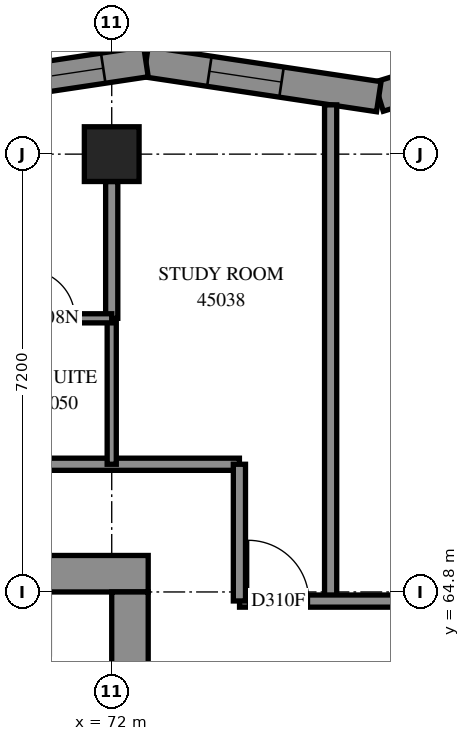
"""IFC4 building model, lengths in metres.
Left out: names, types, materials, properties, quantities, classifications, styles, units other than length and angle.
Written with IfcOpenShell. Run it as: python <this file> out.ifc"""

import sys

from ifc_helpers import new_model, si_unit, direction, frame, frame_2d, origin, origin_2d, place, context, subcontext, project, spatial, polyline, rectangle, outline, extrude, element, fill, save


model = new_model("IFC4")
c1 = context("Model", 3, precision=1e-05, world=origin(), true_north=direction((0.0, 1.0)))
c2 = subcontext(c1, "Body", "Model", "MODEL_VIEW")
j1 = project(units=[si_unit("LENGTHUNIT", "METRE"), si_unit("PLANEANGLEUNIT", "RADIAN")], contexts=[c1])
p1 = place(None, origin())
s1 = spatial("IfcSite", under=j1, at=p1, CompositionType="ELEMENT")
p2 = place(p1, origin())
s2 = spatial("IfcBuilding", under=s1, at=p2, CompositionType="ELEMENT")
p3 = place(p2, frame((0.0, 0.0, 166.0)))
s3 = spatial("IfcBuildingStorey", under=s2, at=p3, CompositionType="ELEMENT", Elevation=166.0)
p4 = place(p3, frame((72.0, 72.0, 0.0), z_axis=(0.0, 0.0, 1.0), x_axis=(1.0, 0.0, 0.0)))
e1 = element("IfcColumn", 1, at=p4, inside=s3, PredefinedType="COLUMN", context=c2, shape_type="SweptSolid", body=[
    extrude(rectangle(XDim=0.9, YDim=0.9, at=origin_2d()), origin(), (0.0, 0.0, 1.0), 3.1),
])
p5 = place(p3, frame((57.0, 65.1, -0.3), z_axis=(0.0, 0.0, 1.0), x_axis=(1.0, 0.0, 0.0)))
e2 = element("IfcWall", 2, at=p5, inside=s3, PredefinedType="SHEAR", context=c2, shape_type="SweptSolid", body=[
    extrude(rectangle(XDim=15.6, YDim=0.6, at=frame_2d((7.8, 0.0))), origin(), (0.0, 0.0, 1.0), 2.7),
])
p6 = place(p5, frame((10.6, 0.0, 0.3)))
e3 = element("IfcOpeningElement", 3, at=p6, cuts=e2, PredefinedType="OPENING", context=c2, shape_type="SweptSolid", body=[
    extrude(rectangle(XDim=0.8, YDim=2.1, at=frame_2d((0.4, 1.05))), frame((0.0, 0.31, 0.0), z_axis=(0.0, -1.0, 0.0), x_axis=(1.0, 0.0, 0.0)), (0.0, 0.0, 1.0), 0.62),
])
p7 = place(p3, frame((72.3, 50.4, -0.3), z_axis=(0.0, 0.0, 1.0), x_axis=(0.0, 1.0, 0.0)))
e4 = element("IfcWall", 4, at=p7, inside=s3, PredefinedType="SHEAR", context=c2, shape_type="SweptSolid", body=[
    extrude(rectangle(XDim=14.4, YDim=0.6, at=frame_2d((7.2, 0.0))), origin(), (0.0, 0.0, 1.0), 2.7),
])
p8 = place(p7, frame((4.55, 0.0, 0.3)))
e5 = element("IfcOpeningElement", 5, at=p8, cuts=e4, PredefinedType="OPENING", context=c2, shape_type="SweptSolid", body=[
    extrude(rectangle(XDim=1.1, YDim=2.1, at=frame_2d((0.55, 1.05))), frame((0.0, 0.31, 0.0), z_axis=(0.0, -1.0, 0.0), x_axis=(1.0, 0.0, 0.0)), (0.0, 0.0, 1.0), 0.62),
])
p9 = place(p7, frame((11.35, 0.0, 0.3)))
e6 = element("IfcOpeningElement", 6, at=p9, cuts=e4, PredefinedType="OPENING", context=c2, shape_type="SweptSolid", body=[
    extrude(rectangle(XDim=1.1, YDim=2.1, at=frame_2d((0.55, 1.05))), frame((0.0, 0.31, 0.0), z_axis=(0.0, -1.0, 0.0), x_axis=(1.0, 0.0, 0.0)), (0.0, 0.0, 1.0), 0.62),
])
p10 = place(p3, frame((80.051, 74.07, 0.0), z_axis=(0.0, 0.0, 1.0), x_axis=(-0.955794256, -0.2940362905, 0.0)))
e7 = element("IfcWall", 7, at=p10, inside=s3, PredefinedType="SOLIDWALL", context=c2, shape_type="SweptSolid", body=[
    extrude(outline(polyline([(-0.214, -0.25), (3.772, -0.25), (3.885, 0.25), (0.214, 0.25), (-0.214, -0.25)])), origin(), (0.0, 0.0, 1.0), 3.1),
])
p11 = place(p10, frame((1.659, 0.0, 0.45)))
e8 = element("IfcOpeningElement", 8, at=p11, cuts=e7, PredefinedType="OPENING", context=c2, shape_type="SweptSolid", body=[
    extrude(rectangle(XDim=1.2, YDim=2.5, at=frame_2d((0.6, 1.25))), frame((0.0, 0.26, 0.0), z_axis=(0.0, -1.0, 0.0), x_axis=(1.0, 0.0, 0.0)), (0.0, 0.0, 1.0), 0.52),
])
p12 = place(p3, frame((76.392, 72.944, 0.0), z_axis=(0.0, 0.0, 1.0), x_axis=(-0.9889143658, 0.1484869591, 0.0)))
e9 = element("IfcWall", 9, at=p12, inside=s3, PredefinedType="SOLIDWALL", context=c2, shape_type="SweptSolid", body=[
    extrude(outline(polyline([(0.057, -0.25), (3.909, -0.25), (3.834, 0.25), (-0.057, 0.25), (0.057, -0.25)])), origin(), (0.0, 0.0, 1.0), 3.1),
])
p13 = place(p12, frame((1.617, 0.0, 0.45)))
e10 = element("IfcOpeningElement", 10, at=p13, cuts=e9, PredefinedType="OPENING", context=c2, shape_type="SweptSolid", body=[
    extrude(rectangle(XDim=1.2, YDim=2.5, at=frame_2d((0.6, 1.25))), frame((0.0, 0.26, 0.0), z_axis=(0.0, -1.0, 0.0), x_axis=(1.0, 0.0, 0.0)), (0.0, 0.0, 1.0), 0.52),
])
p14 = place(p3, frame((72.563, 73.519, 0.0), z_axis=(0.0, 0.0, 1.0), x_axis=(-0.9889150173, -0.1484826202, 0.0)))
e11 = element("IfcWall", 11, at=p14, inside=s3, PredefinedType="SOLIDWALL", context=c2, shape_type="SweptSolid", body=[
    extrude(outline(polyline([(-0.037, -0.25), (3.815, -0.25), (3.89, 0.25), (0.037, 0.25), (-0.037, -0.25)])), origin(), (0.0, 0.0, 1.0), 3.1),
])
p15 = place(p14, frame((0.711, 0.0, 0.45)))
e12 = element("IfcOpeningElement", 12, at=p15, cuts=e11, PredefinedType="OPENING", context=c2, shape_type="SweptSolid", body=[
    extrude(rectangle(XDim=2.8, YDim=2.5, at=frame_2d((1.4, 1.25))), frame((0.0, 0.26, 0.0), z_axis=(0.0, -1.0, 0.0), x_axis=(1.0, 0.0, 0.0)), (0.0, 0.0, 1.0), 0.52),
])
p16 = place(p3, frame((55.5, 66.9, 0.0), z_axis=(0.0, 0.0, 1.0), x_axis=(1.0, 0.0, 0.0)))
e13 = element("IfcWall", 13, at=p16, inside=s3, PredefinedType="PARTITIONING", context=c2, shape_type="SweptSolid", body=[
    extrude(rectangle(XDim=18.6, YDim=0.2, at=frame_2d((9.3, 0.0))), origin(), (0.0, 0.0, 1.0), 3.1),
])
p17 = place(p16, frame((4.45, 0.0, 0.0)))
e14 = element("IfcOpeningElement", 14, at=p17, cuts=e13, PredefinedType="OPENING", context=c2, shape_type="SweptSolid", body=[
    extrude(rectangle(XDim=0.9, YDim=2.1, at=frame_2d((0.45, 1.05))), frame((0.0, 0.11, 0.0), z_axis=(0.0, -1.0, 0.0), x_axis=(1.0, 0.0, 0.0)), (0.0, 0.0, 1.0), 0.22),
])
p18 = place(p16, frame((6.1, 0.0, 0.0)))
e15 = element("IfcOpeningElement", 15, at=p18, cuts=e13, PredefinedType="OPENING", context=c2, shape_type="SweptSolid", body=[
    extrude(rectangle(XDim=0.9, YDim=2.1, at=frame_2d((0.45, 1.05))), frame((0.0, 0.11, 0.0), z_axis=(0.0, -1.0, 0.0), x_axis=(1.0, 0.0, 0.0)), (0.0, 0.0, 1.0), 0.22),
])
p19 = place(p16, frame((11.65, 0.0, 0.0)))
e16 = element("IfcOpeningElement", 16, at=p19, cuts=e13, PredefinedType="OPENING", context=c2, shape_type="SweptSolid", body=[
    extrude(rectangle(XDim=0.9, YDim=2.1, at=frame_2d((0.45, 1.05))), frame((0.0, 0.11, 0.0), z_axis=(0.0, -1.0, 0.0), x_axis=(1.0, 0.0, 0.0)), (0.0, 0.0, 1.0), 0.22),
])
p20 = place(p16, frame((13.3, 0.0, 0.0)))
e17 = element("IfcOpeningElement", 17, at=p20, cuts=e13, PredefinedType="OPENING", context=c2, shape_type="SweptSolid", body=[
    extrude(rectangle(XDim=0.9, YDim=2.1, at=frame_2d((0.45, 1.05))), frame((0.0, 0.11, 0.0), z_axis=(0.0, -1.0, 0.0), x_axis=(1.0, 0.0, 0.0)), (0.0, 0.0, 1.0), 0.22),
])
p21 = place(p3, frame((75.6, 64.65, 0.0), z_axis=(0.0, 0.0, 1.0), x_axis=(0.0, 1.0, 0.0)))
e18 = element("IfcWall", 18, at=p21, inside=s3, PredefinedType="PARTITIONING", context=c2, shape_type="SweptSolid", body=[
    extrude(rectangle(XDim=8.16, YDim=0.2, at=frame_2d((4.08, 0.0))), origin(), (0.0, 0.0, 1.0), 3.1),
])
p22 = place(p3, frame((74.102, 64.65, 0.0), z_axis=(0.0, 0.0, 1.0), x_axis=(1.0, 0.0, 0.0)))
e19 = element("IfcWall", 19, at=p22, inside=s3, PredefinedType="PARTITIONING", context=c2, shape_type="SweptSolid", body=[
    extrude(rectangle(XDim=4.648, YDim=0.2, at=frame_2d((2.324, 0.0))), origin(), (0.0, 0.0, 1.0), 3.1),
])
p23 = place(p22, frame((0.14, 0.0, 0.0)))
e20 = element("IfcOpeningElement", 20, at=p23, cuts=e19, PredefinedType="OPENING", context=c2, shape_type="SweptSolid", body=[
    extrude(rectangle(XDim=1.0, YDim=2.1, at=frame_2d((0.5, 1.05))), frame((0.0, 0.11, 0.0), z_axis=(0.0, -1.0, 0.0), x_axis=(1.0, 0.0, 0.0)), (0.0, 0.0, 1.0), 0.22),
])
p24 = place(p3, frame((72.0, 66.9, 0.0), z_axis=(0.0, 0.0, 1.0), x_axis=(0.0, 1.0, 0.0)))
e21 = element("IfcWall", 21, at=p24, inside=s3, PredefinedType="PARTITIONING", context=c2, shape_type="SweptSolid", body=[
    extrude(rectangle(XDim=2.4, YDim=0.15, at=frame_2d((1.2, 0.0))), origin(), (0.0, 0.0, 1.0), 3.1),
])
p25 = place(p3, frame((72.0, 69.3, 0.0), z_axis=(0.0, 0.0, 1.0), x_axis=(0.0, 1.0, 0.0)))
e22 = element("IfcWall", 22, at=p25, inside=s3, PredefinedType="PARTITIONING", context=c2, shape_type="SweptSolid", body=[
    extrude(rectangle(XDim=2.25, YDim=0.2, at=frame_2d((1.125, 0.0))), origin(), (0.0, 0.0, 1.0), 3.1),
])
p26 = place(p3, frame((74.1, 64.652, 0.0), z_axis=(0.0, 0.0, 1.0), x_axis=(0.0, 1.0, 0.0)))
e23 = element("IfcWall", 23, at=p26, inside=s3, PredefinedType="PARTITIONING", context=c2, shape_type="SweptSolid", body=[
    extrude(rectangle(XDim=2.248, YDim=0.2, at=frame_2d((1.124, 0.0))), origin(), (0.0, 0.0, 1.0), 3.1),
])
p27 = place(p3, frame((70.1, 69.3, 0.0), z_axis=(0.0, 0.0, 1.0), x_axis=(1.0, 0.0, 0.0)))
e24 = element("IfcWall", 24, at=p27, inside=s3, PredefinedType="PARTITIONING", context=c2, shape_type="SweptSolid", body=[
    extrude(rectangle(XDim=1.9, YDim=0.15, at=frame_2d((0.95, 0.0))), origin(), (0.0, 0.0, 1.0), 3.1),
])
p28 = place(p27, frame((0.493, 0.0, 0.0)))
e25 = element("IfcOpeningElement", 25, at=p28, cuts=e24, PredefinedType="OPENING", context=c2, shape_type="SweptSolid", body=[
    extrude(rectangle(XDim=0.8, YDim=2.1, at=frame_2d((0.4, 1.05))), frame((0.0, 0.085, 0.0), z_axis=(0.0, -1.0, 0.0), x_axis=(1.0, 0.0, 0.0)), (0.0, 0.0, 1.0), 0.17),
])
p29 = place(p13, origin())
e26 = element("IfcWindow", 26, at=p29, inside=s3, PartitioningType="SINGLE_PANEL", PredefinedType="WINDOW", context=c2, shape_type="SweptSolid", body=[
    extrude(rectangle(XDim=1.2, YDim=2.5, at=frame_2d((0.6, 1.25))), frame((0.0, 0.18, 0.0), z_axis=(0.0, -1.0, 0.0), x_axis=(1.0, 0.0, 0.0)), (0.0, 0.0, 1.0), 0.06),
])
fill(e10, e26)
p30 = place(p15, origin())
e27 = element("IfcWindow", 27, at=p30, inside=s3, PartitioningType="SINGLE_PANEL", PredefinedType="WINDOW", context=c2, shape_type="SweptSolid", body=[
    extrude(rectangle(XDim=2.8, YDim=2.5, at=frame_2d((1.4, 1.25))), frame((0.0, 0.18, 0.0), z_axis=(0.0, -1.0, 0.0), x_axis=(1.0, 0.0, 0.0)), (0.0, 0.0, 1.0), 0.06),
])
fill(e12, e27)
p31 = place(p23, origin())
e28 = element("IfcDoor", 28, at=p31, inside=s3, OperationType="SINGLE_SWING_RIGHT", PredefinedType="DOOR", context=c2, shape_type="SweptSolid", body=[
    extrude(rectangle(XDim=1.0, YDim=2.1, at=frame_2d((0.5, 1.05))), frame((0.0, 0.025, 0.0), z_axis=(0.0, -1.0, 0.0), x_axis=(1.0, 0.0, 0.0)), (0.0, 0.0, 1.0), 0.05),
])
fill(e20, e28)
p32 = place(p28, origin())
e29 = element("IfcDoor", 29, at=p32, inside=s3, OperationType="SINGLE_SWING_RIGHT", PredefinedType="DOOR", context=c2, shape_type="SweptSolid", body=[
    extrude(rectangle(XDim=0.8, YDim=2.1, at=frame_2d((0.4, 1.05))), frame((0.0, 0.025, 0.0), z_axis=(0.0, -1.0, 0.0), x_axis=(1.0, 0.0, 0.0)), (0.0, 0.0, 1.0), 0.05),
])
fill(e25, e29)
save(model, sys.argv[1])
